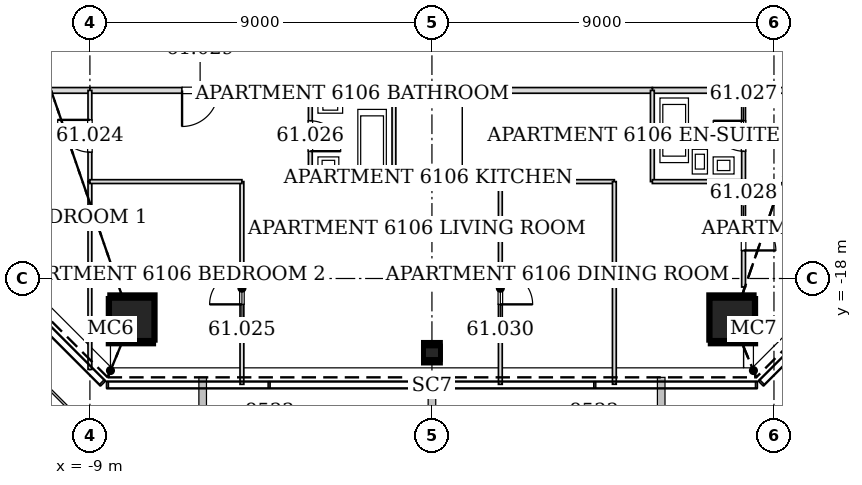
"""IFC4 building model, lengths in metres.
Left out: names, types, materials, properties, quantities, classifications, styles, units other than length and angle.
Written with IfcOpenShell. Run it as: python <this file> out.ifc"""

import sys

from ifc_helpers import new_model, si_unit, direction, frame, frame_2d, origin, origin_2d, place, context, subcontext, project, spatial, rectangle, hollow_rectangle, extrude, element, fill, save


model = new_model("IFC4")
c1 = context("Model", 3, precision=1e-05, world=origin(), true_north=direction((0.0, 1.0)))
c2 = subcontext(c1, "Body", "Model", "MODEL_VIEW")
j1 = project(units=[si_unit("LENGTHUNIT", "METRE"), si_unit("PLANEANGLEUNIT", "RADIAN")], contexts=[c1])
p1 = place(None, origin())
s1 = spatial("IfcSite", under=j1, at=p1, CompositionType="ELEMENT")
p2 = place(p1, origin())
s2 = spatial("IfcBuilding", under=s1, at=p2, CompositionType="ELEMENT")
p3 = place(p2, frame((0.0, 0.0, 255.0)))
s3 = spatial("IfcBuildingStorey", under=s2, at=p3, CompositionType="ELEMENT", Elevation=255.0)
for number, where, z_axis, x_axis in (
    (1, (-7.921, -19.123, 0.0), (0.012, 0.028, 1.0), (-0.924, 0.383, 0.0)),
    (2, (7.921, -19.123, 0.0), (-0.012, 0.028, 1.0), (-0.924, -0.383, 0.0)),
):
    element("IfcColumn", number, at=place(p3, frame(where, z_axis=z_axis, x_axis=x_axis)), inside=s3, PredefinedType="COLUMN", context=c2, shape_type="SweptSolid", body=[
        extrude(hollow_rectangle(XDim=1.2, YDim=1.2, WallThickness=0.055, at=origin_2d()), origin(), (0.0, 0.0, 1.0), 3.401),
    ])
p4 = place(p3, frame((0.0, -20.001, 0.0), z_axis=(0.0, 0.028281086024, 0.999600010091), x_axis=(-1.0, 0.0, 0.0)))
e3 = element("IfcColumn", 3, at=p4, inside=s3, PredefinedType="COLUMN", context=c2, shape_type="SweptSolid", body=[
    extrude(hollow_rectangle(XDim=0.45, YDim=0.45, WallThickness=0.02, at=origin_2d()), origin(), (0.0, 0.0, 1.0), 3.401),
])
p5 = place(p3, frame((-13.05, -13.05, 0.0), z_axis=(0.0, 0.0, 1.0), x_axis=(1.0, 0.0, 0.0)))
e4 = element("IfcWall", 4, at=p5, inside=s3, PredefinedType="PARTITIONING", context=c2, shape_type="SweptSolid", body=[
    extrude(rectangle(XDim=4.051, YDim=0.15, at=frame_2d((2.025, 0.0))), origin(), (0.0, 0.0, 1.0), 2.349),
])
p6 = place(p3, frame((-3.201, -13.05, 0.0), z_axis=(0.0, 0.0, 1.0), x_axis=(1.0, 0.0, 0.0)))
e5 = element("IfcWall", 5, at=p6, inside=s3, PredefinedType="PARTITIONING", context=c2, shape_type="SweptSolid", body=[
    extrude(rectangle(XDim=2.202, YDim=0.15, at=frame_2d((1.101, 0.0))), origin(), (0.0, 0.0, 1.0), 2.662),
])
p7 = place(p3, frame((-1.001, -13.05, 0.0), z_axis=(0.0, 0.0, 1.0), x_axis=(1.0, 0.0, 0.0)))
e6 = element("IfcWall", 6, at=p7, inside=s3, PredefinedType="PARTITIONING", context=c2, shape_type="SweptSolid", body=[
    extrude(rectangle(XDim=0.819, YDim=0.15, at=frame_2d((0.409, 0.0))), origin(), (0.0, 0.0, 1.0), 2.662),
])
p8 = place(p3, frame((0.182, -13.05, 0.0), z_axis=(0.0, 0.0, 1.0), x_axis=(1.0, 0.0, 0.0)))
e7 = element("IfcWall", 7, at=p8, inside=s3, PredefinedType="PARTITIONING", context=c2, shape_type="SweptSolid", body=[
    extrude(rectangle(XDim=0.619, YDim=0.15, at=frame_2d((0.309, 0.0))), origin(), (0.0, 0.0, 1.0), 2.662),
])
p9 = place(p3, frame((-0.182, -13.05, 0.0), z_axis=(0.0, 0.0, 1.0), x_axis=(1.0, 0.0, 0.0)))
e8 = element("IfcWall", 8, at=p9, inside=s3, PredefinedType="PARTITIONING", context=c2, shape_type="SweptSolid", body=[
    extrude(rectangle(XDim=0.365, YDim=0.15, at=frame_2d((0.182, 0.0))), origin(), (0.0, 0.0, 1.0), 2.268),
])
p10 = place(p3, frame((5.799, -13.05, 0.0), z_axis=(0.0, 0.0, 1.0), x_axis=(1.0, 0.0, 0.0)))
e9 = element("IfcWall", 9, at=p10, inside=s3, PredefinedType="PARTITIONING", context=c2, shape_type="SweptSolid", body=[
    extrude(rectangle(XDim=2.402, YDim=0.15, at=frame_2d((1.201, 0.0))), origin(), (0.0, 0.0, 1.0), 2.662),
])
p11 = place(p3, frame((8.199, -13.05, 0.0), z_axis=(0.0, 0.0, 1.0), x_axis=(1.0, 0.0, 0.0)))
e10 = element("IfcWall", 10, at=p11, inside=s3, PredefinedType="PARTITIONING", context=c2, shape_type="SweptSolid", body=[
    extrude(rectangle(XDim=4.851, YDim=0.15, at=frame_2d((2.426, 0.0))), origin(), (0.0, 0.0, 1.0), 2.349),
])
p12 = place(p3, frame((-9.001, -13.05, 0.0), z_axis=(0.0, 0.0, 1.0), x_axis=(1.0, 0.0, 0.0)))
e11 = element("IfcWall", 11, at=p12, inside=s3, PredefinedType="PARTITIONING", context=c2, shape_type="SweptSolid", body=[
    extrude(rectangle(XDim=5.802, YDim=0.15, at=frame_2d((2.901, 0.0))), origin(), (0.0, 0.0, 1.0), 2.662),
])
p13 = place(p12, frame((2.426, 0.0, 0.0)))
e12 = element("IfcOpeningElement", 12, at=p13, cuts=e11, PredefinedType="OPENING", context=c2, shape_type="SweptSolid", body=[
    extrude(rectangle(XDim=0.95, YDim=2.1, at=frame_2d((0.475, 1.05))), frame((0.0, 0.085, 0.0), z_axis=(0.0, -1.0, 0.0), x_axis=(1.0, 0.0, 0.0)), (0.0, 0.0, 1.0), 0.17),
])
p14 = place(p3, frame((0.799, -13.05, 0.0), z_axis=(0.0, 0.0, 1.0), x_axis=(1.0, 0.0, 0.0)))
e13 = element("IfcWall", 13, at=p14, inside=s3, PredefinedType="PARTITIONING", context=c2, shape_type="SweptSolid", body=[
    extrude(rectangle(XDim=5.002, YDim=0.15, at=frame_2d((2.501, 0.0))), origin(), (0.0, 0.0, 1.0), 2.662),
])
p15 = place(p3, frame((-9.0, -20.393, 0.0), z_axis=(0.0, 0.0, 1.0), x_axis=(0.0, 1.0, 0.0)))
e14 = element("IfcWall", 14, at=p15, inside=s3, PredefinedType="PARTITIONING", context=c2, shape_type="SweptSolid", body=[
    extrude(rectangle(XDim=4.944, YDim=0.1, at=frame_2d((2.472, 0.0))), origin(), (0.0, 0.0, 1.0), 2.349),
])
p16 = place(p3, frame((-9.0, -15.451, 0.0), z_axis=(0.0, 0.0, 1.0), x_axis=(0.0, 1.0, 0.0)))
e15 = element("IfcWall", 15, at=p16, inside=s3, PredefinedType="PARTITIONING", context=c2, shape_type="SweptSolid", body=[
    extrude(rectangle(XDim=2.401, YDim=0.1, at=frame_2d((1.2, 0.0))), origin(), (0.0, 0.0, 1.0), 2.349),
])
p17 = place(p16, frame((0.775, 0.0, 0.0)))
e16 = element("IfcOpeningElement", 16, at=p17, cuts=e15, PredefinedType="OPENING", context=c2, shape_type="SweptSolid", body=[
    extrude(rectangle(XDim=0.85, YDim=2.1, at=frame_2d((0.425, 1.05))), frame((0.0, 0.06, 0.0), z_axis=(0.0, -1.0, 0.0), x_axis=(1.0, 0.0, 0.0)), (0.0, 0.0, 1.0), 0.12),
])
p18 = place(p3, frame((-5.0, -20.785, 0.0), z_axis=(0.0, 0.0, 1.0), x_axis=(0.0, 1.0, 0.0)))
e17 = element("IfcWall", 17, at=p18, inside=s3, PredefinedType="PARTITIONING", context=c2, shape_type="SweptSolid", body=[
    extrude(rectangle(XDim=5.335, YDim=0.1, at=frame_2d((2.667, 0.0))), origin(), (0.0, 0.0, 1.0), 2.662),
])
p19 = place(p18, frame((2.104, 0.0, 0.0)))
e18 = element("IfcOpeningElement", 18, at=p19, cuts=e17, PredefinedType="OPENING", context=c2, shape_type="SweptSolid", body=[
    extrude(rectangle(XDim=0.85, YDim=2.1, at=frame_2d((0.425, 1.05))), frame((0.0, 0.06, 0.0), z_axis=(0.0, -1.0, 0.0), x_axis=(1.0, 0.0, 0.0)), (0.0, 0.0, 1.0), 0.12),
])
p20 = place(p3, frame((-5.0, -15.45, 0.0), z_axis=(0.0, 0.0, 1.0), x_axis=(-1.0, 0.0, 0.0)))
e19 = element("IfcWall", 19, at=p20, inside=s3, PredefinedType="PARTITIONING", context=c2, shape_type="SweptSolid", body=[
    extrude(rectangle(XDim=4.0, YDim=0.1, at=frame_2d((2.0, 0.0))), origin(), (0.0, 0.0, 1.0), 2.349),
])
p21 = place(p3, frame((-1.0, -15.45, 0.0), z_axis=(0.0, 0.0, 1.0), x_axis=(0.0, 1.0, 0.0)))
e20 = element("IfcWall", 20, at=p21, inside=s3, PredefinedType="PARTITIONING", context=c2, shape_type="SweptSolid", body=[
    extrude(rectangle(XDim=2.4, YDim=0.1, at=frame_2d((1.2, 0.0))), origin(), (0.0, 0.0, 1.0), 2.662),
])
p22 = place(p3, frame((-3.2, -13.05, 0.0), z_axis=(0.0, 0.0, 1.0), x_axis=(0.0, -1.0, 0.0)))
e21 = element("IfcWall", 21, at=p22, inside=s3, PredefinedType="PARTITIONING", context=c2, shape_type="SweptSolid", body=[
    extrude(rectangle(XDim=2.4, YDim=0.1, at=frame_2d((1.2, 0.0))), origin(), (0.0, 0.0, 1.0), 2.662),
])
p23 = place(p22, frame((0.8, 0.0, 0.0)))
e22 = element("IfcOpeningElement", 22, at=p23, cuts=e21, PredefinedType="OPENING", context=c2, shape_type="SweptSolid", body=[
    extrude(rectangle(XDim=0.8, YDim=2.1, at=frame_2d((0.4, 1.05))), frame((0.0, 0.06, 0.0), z_axis=(0.0, -1.0, 0.0), x_axis=(1.0, 0.0, 0.0)), (0.0, 0.0, 1.0), 0.12),
])
p24 = place(p3, frame((-3.2, -15.45, 0.0), z_axis=(0.0, 0.0, 1.0), x_axis=(1.0, 0.0, 0.0)))
e23 = element("IfcWall", 23, at=p24, inside=s3, PredefinedType="PARTITIONING", context=c2, shape_type="SweptSolid", body=[
    extrude(rectangle(XDim=2.2, YDim=0.1, at=frame_2d((1.1, 0.0))), origin(), (0.0, 0.0, 1.0), 2.74),
])
p25 = place(p3, frame((8.2, -15.45, 0.0), z_axis=(0.0, 0.0, 1.0), x_axis=(0.0, 1.0, 0.0)))
e24 = element("IfcWall", 24, at=p25, inside=s3, PredefinedType="PARTITIONING", context=c2, shape_type="SweptSolid", body=[
    extrude(rectangle(XDim=2.4, YDim=0.1, at=frame_2d((1.2, 0.0))), origin(), (0.0, 0.0, 1.0), 2.662),
])
p26 = place(p25, frame((0.8, 0.0, 0.0)))
e25 = element("IfcOpeningElement", 25, at=p26, cuts=e24, PredefinedType="OPENING", context=c2, shape_type="SweptSolid", body=[
    extrude(rectangle(XDim=0.8, YDim=2.1, at=frame_2d((0.4, 1.05))), frame((0.0, 0.06, 0.0), z_axis=(0.0, -1.0, 0.0), x_axis=(1.0, 0.0, 0.0)), (0.0, 0.0, 1.0), 0.12),
])
p27 = place(p3, frame((5.8, -13.05, 0.0), z_axis=(0.0, 0.0, 1.0), x_axis=(0.0, -1.0, 0.0)))
e26 = element("IfcWall", 26, at=p27, inside=s3, PredefinedType="PARTITIONING", context=c2, shape_type="SweptSolid", body=[
    extrude(rectangle(XDim=2.4, YDim=0.1, at=frame_2d((1.2, 0.0))), origin(), (0.0, 0.0, 1.0), 2.662),
])
p28 = place(p3, frame((5.8, -15.45, 0.0), z_axis=(0.0, 0.0, 1.0), x_axis=(1.0, 0.0, 0.0)))
e27 = element("IfcWall", 27, at=p28, inside=s3, PredefinedType="PARTITIONING", context=c2, shape_type="SweptSolid", body=[
    extrude(rectangle(XDim=2.4, YDim=0.1, at=frame_2d((1.2, 0.0))), origin(), (0.0, 0.0, 1.0), 2.74),
])
p29 = place(p3, frame((8.2, -15.449, 0.0), z_axis=(0.0, 0.0, 1.0), x_axis=(0.0, -1.0, 0.0)))
e28 = element("IfcWall", 28, at=p29, inside=s3, PredefinedType="PARTITIONING", context=c2, shape_type="SweptSolid", body=[
    extrude(rectangle(XDim=2.775, YDim=0.1, at=frame_2d((1.388, 0.0))), origin(), (0.0, 0.0, 1.0), 2.349),
])
p30 = place(p29, frame((0.963, 0.0, 0.0)))
e29 = element("IfcOpeningElement", 29, at=p30, cuts=e28, PredefinedType="OPENING", context=c2, shape_type="SweptSolid", body=[
    extrude(rectangle(XDim=0.85, YDim=2.1, at=frame_2d((0.425, 1.05))), frame((0.0, 0.06, 0.0), z_axis=(0.0, -1.0, 0.0), x_axis=(1.0, 0.0, 0.0)), (0.0, 0.0, 1.0), 0.12),
])
p31 = place(p3, frame((8.2, -19.678, 0.0), z_axis=(0.0, 0.0, 1.0), x_axis=(0.0, -1.0, 0.0)))
e30 = element("IfcWall", 30, at=p31, inside=s3, PredefinedType="PARTITIONING", context=c2, shape_type="SweptSolid", body=[
    extrude(rectangle(XDim=1.105, YDim=0.1, at=frame_2d((0.553, 0.0))), origin(), (0.0, 0.0, 1.0), 3.2),
])
p32 = place(p3, frame((1.8, -20.785, 0.0), z_axis=(0.0, 0.0, 1.0), x_axis=(0.0, 1.0, 0.0)))
e31 = element("IfcWall", 31, at=p32, inside=s3, PredefinedType="PARTITIONING", context=c2, shape_type="SweptSolid", body=[
    extrude(rectangle(XDim=5.335, YDim=0.1, at=frame_2d((2.667, 0.0))), origin(), (0.0, 0.0, 1.0), 2.662),
])
p33 = place(p32, frame((2.104, 0.0, 0.0)))
e32 = element("IfcOpeningElement", 32, at=p33, cuts=e31, PredefinedType="OPENING", context=c2, shape_type="SweptSolid", body=[
    extrude(rectangle(XDim=0.85, YDim=2.1, at=frame_2d((0.425, 1.05))), frame((0.0, 0.06, 0.0), z_axis=(0.0, -1.0, 0.0), x_axis=(1.0, 0.0, 0.0)), (0.0, 0.0, 1.0), 0.12),
])
p34 = place(p3, frame((1.8, -15.45, 0.0), z_axis=(0.0, 0.0, 1.0), x_axis=(1.0, 0.0, 0.0)))
e33 = element("IfcWall", 33, at=p34, inside=s3, PredefinedType="PARTITIONING", context=c2, shape_type="SweptSolid", body=[
    extrude(rectangle(XDim=3.0, YDim=0.1, at=frame_2d((1.5, 0.0))), origin(), (0.0, 0.0, 1.0), 2.74),
])
p35 = place(p3, frame((4.8, -15.45, 0.0), z_axis=(0.0, 0.0, 1.0), x_axis=(0.0, -1.0, 0.0)))
e34 = element("IfcWall", 34, at=p35, inside=s3, PredefinedType="PARTITIONING", context=c2, shape_type="SweptSolid", body=[
    extrude(rectangle(XDim=5.333, YDim=0.1, at=frame_2d((2.667, 0.0))), origin(), (0.0, 0.0, 1.0), 2.662),
])
p36 = place(p17, origin())
e35 = element("IfcDoor", 35, at=p36, inside=s3, OperationType="SINGLE_SWING_RIGHT", PredefinedType="DOOR", context=c2, shape_type="SweptSolid", body=[
    extrude(rectangle(XDim=0.85, YDim=2.1, at=frame_2d((0.425, 1.05))), frame((0.0, 0.025, 0.0), z_axis=(0.0, -1.0, 0.0), x_axis=(1.0, 0.0, 0.0)), (0.0, 0.0, 1.0), 0.05),
])
fill(e16, e35)
p37 = place(p19, origin())
e36 = element("IfcDoor", 36, at=p37, inside=s3, OperationType="SINGLE_SWING_LEFT", PredefinedType="DOOR", context=c2, shape_type="SweptSolid", body=[
    extrude(rectangle(XDim=0.85, YDim=2.1, at=frame_2d((0.425, 1.05))), frame((0.0, 0.025, 0.0), z_axis=(0.0, -1.0, 0.0), x_axis=(1.0, 0.0, 0.0)), (0.0, 0.0, 1.0), 0.05),
])
fill(e18, e36)
p38 = place(p23, origin())
e37 = element("IfcDoor", 37, at=p38, inside=s3, OperationType="SINGLE_SWING_RIGHT", PredefinedType="DOOR", context=c2, shape_type="SweptSolid", body=[
    extrude(rectangle(XDim=0.8, YDim=2.1, at=frame_2d((0.4, 1.05))), frame((0.0, 0.025, 0.0), z_axis=(0.0, -1.0, 0.0), x_axis=(1.0, 0.0, 0.0)), (0.0, 0.0, 1.0), 0.05),
])
fill(e22, e37)
p39 = place(p26, origin())
e38 = element("IfcDoor", 38, at=p39, inside=s3, OperationType="SINGLE_SWING_RIGHT", PredefinedType="DOOR", context=c2, shape_type="SweptSolid", body=[
    extrude(rectangle(XDim=0.8, YDim=2.1, at=frame_2d((0.4, 1.05))), frame((0.0, 0.025, 0.0), z_axis=(0.0, -1.0, 0.0), x_axis=(1.0, 0.0, 0.0)), (0.0, 0.0, 1.0), 0.05),
])
fill(e25, e38)
p40 = place(p30, origin())
e39 = element("IfcDoor", 39, at=p40, inside=s3, OperationType="SINGLE_SWING_RIGHT", PredefinedType="DOOR", context=c2, shape_type="SweptSolid", body=[
    extrude(rectangle(XDim=0.85, YDim=2.1, at=frame_2d((0.425, 1.05))), frame((0.0, 0.025, 0.0), z_axis=(0.0, -1.0, 0.0), x_axis=(1.0, 0.0, 0.0)), (0.0, 0.0, 1.0), 0.05),
])
fill(e29, e39)
p41 = place(p13, frame((0.95, 0.0, 0.0), z_axis=(0.0, 0.0, 1.0), x_axis=(-1.0, 0.0, 0.0)))
e40 = element("IfcDoor", 40, at=p41, inside=s3, OperationType="SINGLE_SWING_RIGHT", PredefinedType="DOOR", context=c2, shape_type="SweptSolid", body=[
    extrude(rectangle(XDim=0.95, YDim=2.1, at=frame_2d((0.475, 1.05))), frame((0.0, 0.025, 0.0), z_axis=(0.0, -1.0, 0.0), x_axis=(1.0, 0.0, 0.0)), (0.0, 0.0, 1.0), 0.05),
])
fill(e12, e40)
p42 = place(p33, frame((0.85, 0.0, 0.0), z_axis=(0.0, 0.0, 1.0), x_axis=(-1.0, 0.0, 0.0)))
e41 = element("IfcDoor", 41, at=p42, inside=s3, OperationType="SINGLE_SWING_RIGHT", PredefinedType="DOOR", context=c2, shape_type="SweptSolid", body=[
    extrude(rectangle(XDim=0.85, YDim=2.1, at=frame_2d((0.425, 1.05))), frame((0.0, 0.025, 0.0), z_axis=(0.0, -1.0, 0.0), x_axis=(1.0, 0.0, 0.0)), (0.0, 0.0, 1.0), 0.05),
])
fill(e32, e41)
save(model, sys.argv[1])
